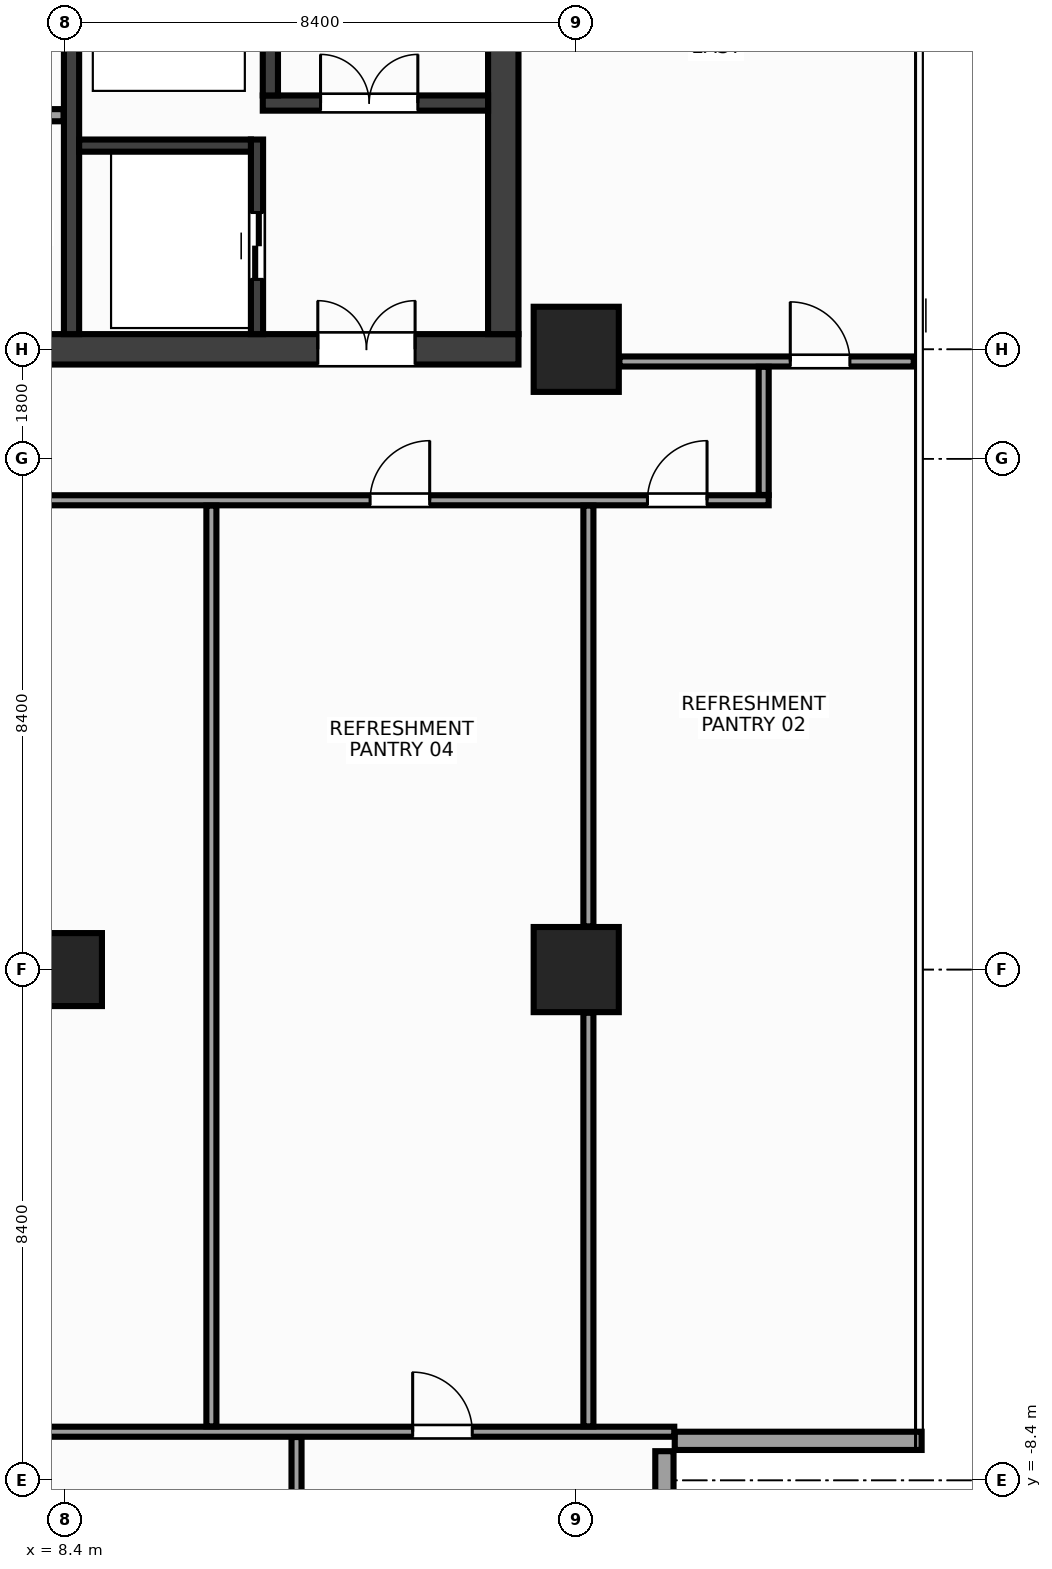
"""IFC4 building model, lengths in metres.
Left out: names, types, materials, properties, quantities, classifications, styles, units other than length and angle.
Written with IfcOpenShell. Run it as: python <this file> out.ifc"""

import sys

from ifc_helpers import new_model, si_unit, direction, frame, frame_2d, origin, origin_2d, place, context, subcontext, project, spatial, rectangle, extrude, source, transform, mapped, element, fill, save


model = new_model("IFC4")
c1 = context("Model", 3, precision=1e-05, world=origin(), true_north=direction((0.0, 1.0)))
c2 = subcontext(c1, "Body", "Model", "MODEL_VIEW")
j1 = project(units=[si_unit("LENGTHUNIT", "METRE"), si_unit("PLANEANGLEUNIT", "RADIAN")], contexts=[c1])
p1 = place(None, origin())
s1 = spatial("IfcSite", under=j1, at=p1, CompositionType="ELEMENT")
p2 = place(p1, origin())
s2 = spatial("IfcBuilding", under=s1, at=p2, CompositionType="ELEMENT")
p3 = place(p2, frame((0.0, 0.0, 261.2)))
s3 = spatial("IfcBuildingStorey", under=s2, at=p3, CompositionType="ELEMENT", Elevation=261.2)
m1 = source(origin(), c2, "Body", "SweptSolid", [
    extrude(rectangle(XDim=31.7, YDim=0.5, at=frame_2d((15.85, 0.0))), origin(), (0.0, 0.0, 1.0), 3.6),
])
p4 = place(p3, frame((-15.85, 10.2, 0.0), z_axis=(0.0, 0.0, 1.0), x_axis=(1.0, 0.0, 0.0)))
e1 = element("IfcWall", 1, at=p4, inside=s3, PredefinedType="SHEAR", context=c2, shape_type="MappedRepresentation", body=[
    mapped(m1, transform((0.0, 0.0, 0.0), x_axis=(1.0, 0.0, 0.0), y_axis=(0.0, 1.0, 0.0), z_axis=(0.0, 0.0, 1.0), scale=1.0)),
])
p5 = place(p4, frame((1.7, 0.0, 0.0)))
e2 = element("IfcOpeningElement", 2, at=p5, cuts=e1, PredefinedType="OPENING", context=c2, shape_type="SweptSolid", body=[
    extrude(rectangle(XDim=1.6, YDim=2.15, at=frame_2d((0.8, 1.075))), frame((0.0, 0.262, 0.0), z_axis=(0.0, -1.0, 0.0), x_axis=(1.0, 0.0, 0.0)), (0.0, 0.0, 1.0), 0.524),
])
p6 = place(p4, frame((28.4, 0.0, 0.0)))
e3 = element("IfcOpeningElement", 3, at=p6, cuts=e1, PredefinedType="OPENING", context=c2, shape_type="SweptSolid", body=[
    extrude(rectangle(XDim=1.6, YDim=2.15, at=frame_2d((0.8, 1.075))), frame((0.0, 0.262, 0.0), z_axis=(0.0, -1.0, 0.0), x_axis=(1.0, 0.0, 0.0)), (0.0, 0.0, 1.0), 0.524),
])
p7 = place(p4, frame((15.1, 0.0, 0.0)))
e4 = element("IfcOpeningElement", 4, at=p7, cuts=e1, PredefinedType="OPENING", context=c2, shape_type="SweptSolid", body=[
    extrude(rectangle(XDim=1.5, YDim=2.2, at=frame_2d((0.75, 1.1))), frame((0.0, 0.262, 0.0), z_axis=(0.0, -1.0, 0.0), x_axis=(1.0, 0.0, 0.0)), (0.0, 0.0, 1.0), 0.524),
])
m2 = source(origin(), c2, "Body", "SweptSolid", [
    extrude(rectangle(XDim=13.1, YDim=0.5, at=frame_2d((6.55, 0.0))), origin(), (0.0, 0.0, 1.0), 3.6),
])
p8 = place(p3, frame((15.6, 10.45, 0.0), z_axis=(0.0, 0.0, 1.0), x_axis=(0.0, 1.0, 0.0)))
e5 = element("IfcWall", 5, at=p8, inside=s3, PredefinedType="SHEAR", context=c2, shape_type="MappedRepresentation", body=[
    mapped(m2, transform((0.0, 0.0, 0.0), x_axis=(1.0, 0.0, 0.0), y_axis=(0.0, 1.0, 0.0), z_axis=(0.0, 0.0, 1.0), scale=1.0)),
])
m3 = source(origin(), c2, "Body", "SweptSolid", [
    extrude(rectangle(XDim=13.1, YDim=0.25, at=frame_2d((6.55, 0.0))), origin(), (0.0, 0.0, 1.0), 3.6),
])
p9 = place(p3, frame((8.5, 10.45, 0.0), z_axis=(0.0, 0.0, 1.0), x_axis=(0.0, 1.0, 0.0)))
e6 = element("IfcWall", 6, at=p9, inside=s3, PredefinedType="SHEAR", context=c2, shape_type="MappedRepresentation", body=[
    mapped(m3, transform((0.0, 0.0, 0.0), x_axis=(1.0, 0.0, 0.0), y_axis=(0.0, 1.0, 0.0), z_axis=(0.0, 0.0, 1.0), scale=1.0)),
])
p10 = place(p9, frame((10.0, 0.0, 0.0)))
e7 = element("IfcOpeningElement", 7, at=p10, cuts=e6, PredefinedType="OPENING", context=c2, shape_type="SweptSolid", body=[
    extrude(rectangle(XDim=0.95, YDim=2.15, at=frame_2d((0.475, 1.075))), frame((0.0, 0.137, 0.0), z_axis=(0.0, -1.0, 0.0), x_axis=(1.0, 0.0, 0.0)), (0.0, 0.0, 1.0), 0.274),
])
m4 = source(origin(), c2, "Body", "SweptSolid", [
    extrude(rectangle(XDim=3.705, YDim=0.25, at=frame_2d((1.853, 0.0))), origin(), (0.0, 0.0, 1.0), 3.6),
])
p11 = place(p3, frame((11.645, 14.25, 0.0), z_axis=(0.0, 0.0, 1.0), x_axis=(1.0, 0.0, 0.0)))
e8 = element("IfcWall", 8, at=p11, inside=s3, PredefinedType="SHEAR", context=c2, shape_type="MappedRepresentation", body=[
    mapped(m4, transform((0.0, 0.0, 0.0), x_axis=(1.0, 0.0, 0.0), y_axis=(0.0, 1.0, 0.0), z_axis=(0.0, 0.0, 1.0), scale=1.0)),
])
p12 = place(p11, frame((0.95, 0.0, 0.0)))
e9 = element("IfcOpeningElement", 9, at=p12, cuts=e8, PredefinedType="OPENING", context=c2, shape_type="SweptSolid", body=[
    extrude(rectangle(XDim=1.6, YDim=2.15, at=frame_2d((0.8, 1.075))), frame((0.0, 0.137, 0.0), z_axis=(0.0, -1.0, 0.0), x_axis=(1.0, 0.0, 0.0)), (0.0, 0.0, 1.0), 0.274),
])
m5 = source(origin(), c2, "Body", "SweptSolid", [
    extrude(rectangle(XDim=9.175, YDim=0.25, at=frame_2d((4.587, 0.0))), origin(), (0.0, 0.0, 1.0), 3.6),
])
p13 = place(p3, frame((11.77, 14.375, 0.0), z_axis=(0.0, 0.0, 1.0), x_axis=(0.0, 1.0, 0.0)))
e10 = element("IfcWall", 10, at=p13, inside=s3, PredefinedType="SHEAR", context=c2, shape_type="MappedRepresentation", body=[
    mapped(m5, transform((0.0, 0.0, 0.0), x_axis=(1.0, 0.0, 0.0), y_axis=(0.0, 1.0, 0.0), z_axis=(0.0, 0.0, 1.0), scale=1.0)),
])
m6 = source(origin(), c2, "Body", "SweptSolid", [
    extrude(rectangle(XDim=3.2, YDim=0.2, at=frame_2d((1.6, 0.0))), origin(), (0.0, 0.0, 1.0), 3.6),
])
p14 = place(p3, frame((11.55, 10.45, 0.0), z_axis=(0.0, 0.0, 1.0), x_axis=(0.0, 1.0, 0.0)))
e11 = element("IfcWall", 11, at=p14, inside=s3, PredefinedType="SHEAR", context=c2, shape_type="MappedRepresentation", body=[
    mapped(m6, transform((0.0, 0.0, 0.0), x_axis=(1.0, 0.0, 0.0), y_axis=(0.0, 1.0, 0.0), z_axis=(0.0, 0.0, 1.0), scale=1.0)),
])
p15 = place(p14, frame((0.9, 0.0, 0.0)))
e12 = element("IfcOpeningElement", 12, at=p15, cuts=e11, PredefinedType="OPENING", context=c2, shape_type="SweptSolid", body=[
    extrude(rectangle(XDim=1.1, YDim=2.15, at=frame_2d((0.55, 1.075))), frame((0.0, 0.112, 0.0), z_axis=(0.0, -1.0, 0.0), x_axis=(1.0, 0.0, 0.0)), (0.0, 0.0, 1.0), 0.224),
])
m7 = source(origin(), c2, "Body", "SweptSolid", [
    extrude(rectangle(XDim=2.825, YDim=0.2, at=frame_2d((1.413, 0.0))), origin(), (0.0, 0.0, 1.0), 3.6),
])
p16 = place(p3, frame((8.625, 13.55, 0.0), z_axis=(0.0, 0.0, 1.0), x_axis=(1.0, 0.0, 0.0)))
e13 = element("IfcWall", 13, at=p16, inside=s3, PredefinedType="SHEAR", context=c2, shape_type="MappedRepresentation", body=[
    mapped(m7, transform((0.0, 0.0, 0.0), x_axis=(1.0, 0.0, 0.0), y_axis=(0.0, 1.0, 0.0), z_axis=(0.0, 0.0, 1.0), scale=1.0)),
])
m8 = source(origin(), c2, "Body", "SweptSolid", [
    extrude(rectangle(XDim=1.4, YDim=1.4, at=origin_2d()), origin(), (0.0, 0.0, 1.0), 3.6),
])
for number, where, z_axis, x_axis in (
    (14, (16.8, 0.0, 0.0), (0.0, 0.0, 1.0), (1.0, 0.0, 0.0)),
    (15, (16.8, 10.2, 0.0), (0.0, 0.0, 1.0), (1.0, 0.0, 0.0)),
):
    element("IfcColumn", number, at=place(p3, frame(where, z_axis=z_axis, x_axis=x_axis)), inside=s3, PredefinedType="COLUMN", context=c2, shape_type="MappedRepresentation", body=[
        mapped(m8, transform((0.0, 0.0, 0.0), x_axis=(1.0, 0.0, 0.0), y_axis=(0.0, 1.0, 0.0), z_axis=(0.0, 0.0, 1.0), scale=1.0)),
    ])
m9 = source(origin(), c2, "Body", "SweptSolid", [
    extrude(rectangle(XDim=1.2, YDim=1.2, at=origin_2d()), origin(), (0.0, 0.0, 1.0), 3.6),
])
p17 = place(p3, frame((8.4, 0.0, 0.0), z_axis=(0.0, 0.0, 1.0), x_axis=(1.0, 0.0, 0.0)))
e16 = element("IfcColumn", 16, at=p17, inside=s3, PredefinedType="COLUMN", context=c2, shape_type="MappedRepresentation", body=[
    mapped(m9, transform((0.0, 0.0, 0.0), x_axis=(1.0, 0.0, 0.0), y_axis=(0.0, 1.0, 0.0), z_axis=(0.0, 0.0, 1.0), scale=1.0)),
])
m10 = source(origin(), c2, "Body", "SweptSolid", [
    extrude(rectangle(XDim=4.06, YDim=0.3, at=frame_2d((2.03, 0.0))), origin(), (0.0, 0.0, 1.0), 2.75),
])
for number, where, z_axis, x_axis in (
    (17, (18.25, -11.98, 0.0), (0.0, 0.0, 1.0), (0.0, 1.0, 0.0)),
    (18, (18.42, -7.75, 0.0), (0.0, 0.0, 1.0), (1.0, 0.0, 0.0)),
):
    element("IfcWall", number, at=place(p3, frame(where, z_axis=z_axis, x_axis=x_axis)), inside=s3, PredefinedType="STANDARD", context=c2, shape_type="MappedRepresentation", body=[
        mapped(m10, transform((0.0, 0.0, 0.0), x_axis=(1.0, 0.0, 0.0), y_axis=(0.0, 1.0, 0.0), z_axis=(0.0, 0.0, 1.0), scale=1.0)),
    ])
m11 = source(origin(), c2, "Body", "SweptSolid", [
    extrude(rectangle(XDim=7.07, YDim=0.2, at=frame_2d((3.535, 0.0))), origin(), (0.0, 0.0, 1.0), 3.37),
])
p18 = place(p3, frame((1.3, 14.05, 0.0), z_axis=(0.0, 0.0, 1.0), x_axis=(1.0, 0.0, 0.0)))
e19 = element("IfcWall", 19, at=p18, inside=s3, PredefinedType="PARTITIONING", context=c2, shape_type="MappedRepresentation", body=[
    mapped(m11, transform((0.0, 0.0, 0.0), x_axis=(1.0, 0.0, 0.0), y_axis=(0.0, 1.0, 0.0), z_axis=(0.0, 0.0, 1.0), scale=1.0)),
])
p19 = place(p18, frame((1.71, 0.0, 0.0)))
e20 = element("IfcOpeningElement", 20, at=p19, cuts=e19, PredefinedType="OPENING", context=c2, shape_type="SweptSolid", body=[
    extrude(rectangle(XDim=0.9, YDim=2.15, at=frame_2d((0.45, 1.075))), frame((0.0, 0.112, 0.0), z_axis=(0.0, -1.0, 0.0), x_axis=(1.0, 0.0, 0.0)), (0.0, 0.0, 1.0), 0.224),
])
p20 = place(p18, frame((5.16, 0.0, 0.0)))
e21 = element("IfcOpeningElement", 21, at=p20, cuts=e19, PredefinedType="OPENING", context=c2, shape_type="SweptSolid", body=[
    extrude(rectangle(XDim=0.9, YDim=2.15, at=frame_2d((0.45, 1.075))), frame((0.0, 0.112, 0.0), z_axis=(0.0, -1.0, 0.0), x_axis=(1.0, 0.0, 0.0)), (0.0, 0.0, 1.0), 0.224),
])
m12 = source(origin(), c2, "Body", "SweptSolid", [
    extrude(rectangle(XDim=4.84, YDim=0.165, at=frame_2d((2.42, 0.0))), origin(), (0.0, 0.0, 1.0), 3.37),
])
p21 = place(p3, frame((17.51, 10.0, 0.0), z_axis=(0.0, 0.0, 1.0), x_axis=(1.0, 0.0, 0.0)))
e22 = element("IfcWall", 22, at=p21, inside=s3, PredefinedType="PARTITIONING", context=c2, shape_type="MappedRepresentation", body=[
    mapped(m12, transform((0.0, 0.0, 0.0), x_axis=(1.0, 0.0, 0.0), y_axis=(0.0, 1.0, 0.0), z_axis=(0.0, 0.0, 1.0), scale=1.0)),
])
p22 = place(p21, frame((2.81, 0.0, 0.0)))
e23 = element("IfcOpeningElement", 23, at=p22, cuts=e22, PredefinedType="OPENING", context=c2, shape_type="SweptSolid", body=[
    extrude(rectangle(XDim=0.98, YDim=2.15, at=frame_2d((0.49, 1.075))), frame((0.0, 0.094, 0.0), z_axis=(0.0, -1.0, 0.0), x_axis=(1.0, 0.0, 0.0)), (0.0, 0.0, 1.0), 0.189),
])
m13 = source(origin(), c2, "Body", "SweptSolid", [
    extrude(rectangle(XDim=21.9, YDim=0.165, at=frame_2d((10.95, 0.0))), origin(), (0.0, 0.0, 1.0), 2.755),
])
p23 = place(p3, frame((-1.935, 7.718, 0.0), z_axis=(0.0, 0.0, 1.0), x_axis=(1.0, 0.0, 0.0)))
e24 = element("IfcWall", 24, at=p23, inside=s3, PredefinedType="PARTITIONING", context=c2, shape_type="MappedRepresentation", body=[
    mapped(m13, transform((0.0, 0.0, 0.0), x_axis=(1.0, 0.0, 0.0), y_axis=(0.0, 1.0, 0.0), z_axis=(0.0, 0.0, 1.0), scale=1.0)),
])
p24 = place(p23, frame((19.906, 0.0, 0.0)))
e25 = element("IfcOpeningElement", 25, at=p24, cuts=e24, PredefinedType="OPENING", context=c2, shape_type="SweptSolid", body=[
    extrude(rectangle(XDim=0.98, YDim=2.15, at=frame_2d((0.49, 1.075))), frame((0.0, 0.094, 0.0), z_axis=(0.0, -1.0, 0.0), x_axis=(1.0, 0.0, 0.0)), (0.0, 0.0, 1.0), 0.189),
])
p25 = place(p23, frame((15.345, 0.0, 0.0)))
e26 = element("IfcOpeningElement", 26, at=p25, cuts=e24, PredefinedType="OPENING", context=c2, shape_type="SweptSolid", body=[
    extrude(rectangle(XDim=0.98, YDim=2.15, at=frame_2d((0.49, 1.075))), frame((0.0, 0.094, 0.0), z_axis=(0.0, -1.0, 0.0), x_axis=(1.0, 0.0, 0.0)), (0.0, 0.0, 1.0), 0.189),
])
m14 = source(origin(), c2, "Body", "SweptSolid", [
    extrude(rectangle(XDim=2.108, YDim=0.165, at=frame_2d((1.054, 0.0))), origin(), (0.0, 0.0, 1.0), 3.37),
])
p26 = place(p3, frame((19.883, 7.805, 0.0), z_axis=(0.0, 0.0, 1.0), x_axis=(0.0, 1.0, 0.0)))
e27 = element("IfcWall", 27, at=p26, inside=s3, PredefinedType="PARTITIONING", context=c2, shape_type="MappedRepresentation", body=[
    mapped(m14, transform((0.0, 0.0, 0.0), x_axis=(1.0, 0.0, 0.0), y_axis=(0.0, 1.0, 0.0), z_axis=(0.0, 0.0, 1.0), scale=1.0)),
])
m15 = source(origin(), c2, "Body", "SweptSolid", [
    extrude(rectangle(XDim=36.824, YDim=0.165, at=frame_2d((18.412, 0.0))), origin(), (0.0, 0.0, 1.0), 2.755),
])
p27 = place(p3, frame((-18.412, -7.6, 0.0), z_axis=(0.0, 0.0, 1.0), x_axis=(1.0, 0.0, 0.0)))
e28 = element("IfcWall", 28, at=p27, inside=s3, PredefinedType="PARTITIONING", context=c2, shape_type="MappedRepresentation", body=[
    mapped(m15, transform((0.0, 0.0, 0.0), x_axis=(1.0, 0.0, 0.0), y_axis=(0.0, 1.0, 0.0), z_axis=(0.0, 0.0, 1.0), scale=1.0)),
])
p28 = place(p27, frame((3.222, 0.0, 0.0)))
e29 = element("IfcOpeningElement", 29, at=p28, cuts=e28, PredefinedType="OPENING", context=c2, shape_type="SweptSolid", body=[
    extrude(rectangle(XDim=0.98, YDim=2.15, at=frame_2d((0.49, 1.075))), frame((0.0, 0.094, 0.0), z_axis=(0.0, -1.0, 0.0), x_axis=(1.0, 0.0, 0.0)), (0.0, 0.0, 1.0), 0.189),
])
p29 = place(p27, frame((32.522, 0.0, 0.0)))
e30 = element("IfcOpeningElement", 30, at=p29, cuts=e28, PredefinedType="OPENING", context=c2, shape_type="SweptSolid", body=[
    extrude(rectangle(XDim=0.98, YDim=2.15, at=frame_2d((0.49, 1.075))), frame((0.0, 0.094, 0.0), z_axis=(0.0, -1.0, 0.0), x_axis=(1.0, 0.0, 0.0)), (0.0, 0.0, 1.0), 0.189),
])
p30 = place(p27, frame((9.922, 0.0, 0.0)))
e31 = element("IfcOpeningElement", 31, at=p30, cuts=e28, PredefinedType="OPENING", context=c2, shape_type="SweptSolid", body=[
    extrude(rectangle(XDim=0.98, YDim=2.15, at=frame_2d((0.49, 1.075))), frame((0.0, 0.094, 0.0), z_axis=(0.0, -1.0, 0.0), x_axis=(1.0, 0.0, 0.0)), (0.0, 0.0, 1.0), 0.189),
])
p31 = place(p27, frame((17.122, 0.0, 0.0)))
e32 = element("IfcOpeningElement", 32, at=p31, cuts=e28, PredefinedType="OPENING", context=c2, shape_type="SweptSolid", body=[
    extrude(rectangle(XDim=0.98, YDim=2.15, at=frame_2d((0.49, 1.075))), frame((0.0, 0.094, 0.0), z_axis=(0.0, -1.0, 0.0), x_axis=(1.0, 0.0, 0.0)), (0.0, 0.0, 1.0), 0.189),
])
p32 = place(p27, frame((25.122, 0.0, 0.0)))
e33 = element("IfcOpeningElement", 33, at=p32, cuts=e28, PredefinedType="OPENING", context=c2, shape_type="SweptSolid", body=[
    extrude(rectangle(XDim=0.98, YDim=2.15, at=frame_2d((0.49, 1.075))), frame((0.0, 0.094, 0.0), z_axis=(0.0, -1.0, 0.0), x_axis=(1.0, 0.0, 0.0)), (0.0, 0.0, 1.0), 0.189),
])
m16 = source(origin(), c2, "Body", "SweptSolid", [
    extrude(rectangle(XDim=15.142, YDim=0.165, at=frame_2d((7.571, 0.0))), origin(), (0.0, 0.0, 1.0), 2.655),
])
p33 = place(p3, frame((10.8, -7.512, 0.0), z_axis=(0.0, 0.0, 1.0), x_axis=(0.0, 1.0, 0.0)))
e34 = element("IfcWall", 34, at=p33, inside=s3, PredefinedType="PARTITIONING", context=c2, shape_type="MappedRepresentation", body=[
    mapped(m16, transform((0.0, 0.0, 0.0), x_axis=(1.0, 0.0, 0.0), y_axis=(0.0, 1.0, 0.0), z_axis=(0.0, 0.0, 1.0), scale=1.0)),
])
m17 = source(origin(), c2, "Body", "SweptSolid", [
    extrude(rectangle(XDim=6.802, YDim=0.165, at=frame_2d((3.401, 0.0))), origin(), (0.0, 0.0, 1.0), 2.755),
])
p34 = place(p3, frame((17.0, -7.512, 0.0), z_axis=(0.0, 0.0, 1.0), x_axis=(0.0, 1.0, 0.0)))
e35 = element("IfcWall", 35, at=p34, inside=s3, PredefinedType="PARTITIONING", context=c2, shape_type="MappedRepresentation", body=[
    mapped(m17, transform((0.0, 0.0, 0.0), x_axis=(1.0, 0.0, 0.0), y_axis=(0.0, 1.0, 0.0), z_axis=(0.0, 0.0, 1.0), scale=1.0)),
])
m18 = source(origin(), c2, "Body", "SweptSolid", [
    extrude(rectangle(XDim=6.92, YDim=0.165, at=frame_2d((3.46, 0.0))), origin(), (0.0, 0.0, 1.0), 2.755),
])
p35 = place(p3, frame((17.0, 0.71, 0.0), z_axis=(0.0, 0.0, 1.0), x_axis=(0.0, 1.0, 0.0)))
e36 = element("IfcWall", 36, at=p35, inside=s3, PredefinedType="PARTITIONING", context=c2, shape_type="MappedRepresentation", body=[
    mapped(m18, transform((0.0, 0.0, 0.0), x_axis=(1.0, 0.0, 0.0), y_axis=(0.0, 1.0, 0.0), z_axis=(0.0, 0.0, 1.0), scale=1.0)),
])
m19 = source(origin(), c2, "Body", "SweptSolid", [
    extrude(rectangle(XDim=4.163, YDim=0.165, at=frame_2d((2.081, 0.0))), origin(), (0.0, 0.0, 1.0), 2.905),
])
p36 = place(p3, frame((12.2, -11.85, 0.0), z_axis=(0.0, 0.0, 1.0), x_axis=(0.0, 1.0, 0.0)))
e37 = element("IfcWall", 37, at=p36, inside=s3, PredefinedType="PARTITIONING", context=c2, shape_type="MappedRepresentation", body=[
    mapped(m19, transform((0.0, 0.0, 0.0), x_axis=(1.0, 0.0, 0.0), y_axis=(0.0, 1.0, 0.0), z_axis=(0.0, 0.0, 1.0), scale=1.0)),
])
m20 = source(origin(), c2, "Body", "SweptSolid", [
    extrude(rectangle(XDim=1.6, YDim=2.15, at=frame_2d((0.8, 1.075))), frame((0.0, 0.025, 0.0), z_axis=(0.0, -1.0, 0.0), x_axis=(1.0, 0.0, 0.0)), (0.0, 0.0, 1.0), 0.05),
])
p37 = place(p12, origin())
e38 = element("IfcDoor", 38, at=p37, inside=s3, OperationType="DOUBLE_DOOR_SINGLE_SWING", PredefinedType="DOOR", context=c2, shape_type="MappedRepresentation", body=[
    mapped(m20, transform((0.0, 0.0, 0.0), x_axis=(1.0, 0.0, 0.0), y_axis=(0.0, 1.0, 0.0), z_axis=(0.0, 0.0, 1.0), scale=1.0)),
])
fill(e9, e38)
p38 = place(p6, origin())
e39 = element("IfcDoor", 39, at=p38, inside=s3, OperationType="DOUBLE_DOOR_SINGLE_SWING", PredefinedType="DOOR", context=c2, shape_type="MappedRepresentation", body=[
    mapped(m20, transform((0.0, 0.0, 0.0), x_axis=(1.0, 0.0, 0.0), y_axis=(0.0, 1.0, 0.0), z_axis=(0.0, 0.0, 1.0), scale=1.0)),
])
fill(e3, e39)
m21 = source(origin(), c2, "Body", "SweptSolid", [
    extrude(rectangle(XDim=1.1, YDim=2.15, at=frame_2d((0.55, 1.075))), frame((0.0, 0.025, 0.0), z_axis=(0.0, -1.0, 0.0), x_axis=(1.0, 0.0, 0.0)), (0.0, 0.0, 1.0), 0.05),
])
p39 = place(p15, origin())
e40 = element("IfcDoor", 40, at=p39, inside=s3, OperationType="DOUBLE_DOOR_SLIDING", PredefinedType="DOOR", context=c2, shape_type="MappedRepresentation", body=[
    mapped(m21, transform((0.0, 0.0, 0.0), x_axis=(1.0, 0.0, 0.0), y_axis=(0.0, 1.0, 0.0), z_axis=(0.0, 0.0, 1.0), scale=1.0)),
])
fill(e12, e40)
m22 = source(origin(), c2, "Body", "SweptSolid", [
    extrude(rectangle(XDim=0.98, YDim=2.15, at=frame_2d((0.49, 1.075))), frame((0.0, 0.025, 0.0), z_axis=(0.0, -1.0, 0.0), x_axis=(1.0, 0.0, 0.0)), (0.0, 0.0, 1.0), 0.05),
])
p40 = place(p24, origin())
e41 = element("IfcDoor", 41, at=p40, inside=s3, OperationType="SINGLE_SWING_RIGHT", PredefinedType="DOOR", context=c2, shape_type="MappedRepresentation", body=[
    mapped(m22, transform((0.0, 0.0, 0.0), x_axis=(1.0, 0.0, 0.0), y_axis=(0.0, 1.0, 0.0), z_axis=(0.0, 0.0, 1.0), scale=1.0)),
])
fill(e25, e41)
p41 = place(p25, origin())
e42 = element("IfcDoor", 42, at=p41, inside=s3, OperationType="SINGLE_SWING_RIGHT", PredefinedType="DOOR", context=c2, shape_type="MappedRepresentation", body=[
    mapped(m22, transform((0.0, 0.0, 0.0), x_axis=(1.0, 0.0, 0.0), y_axis=(0.0, 1.0, 0.0), z_axis=(0.0, 0.0, 1.0), scale=1.0)),
])
fill(e26, e42)
p42 = place(p22, origin())
e43 = element("IfcDoor", 43, at=p42, inside=s3, OperationType="SINGLE_SWING_LEFT", PredefinedType="DOOR", context=c2, shape_type="MappedRepresentation", body=[
    mapped(m22, transform((0.0, 0.0, 0.0), x_axis=(1.0, 0.0, 0.0), y_axis=(0.0, 1.0, 0.0), z_axis=(0.0, 0.0, 1.0), scale=1.0)),
])
fill(e23, e43)
p43 = place(p29, origin())
e44 = element("IfcDoor", 44, at=p43, inside=s3, OperationType="SINGLE_SWING_LEFT", PredefinedType="DOOR", context=c2, shape_type="MappedRepresentation", body=[
    mapped(m22, transform((0.0, 0.0, 0.0), x_axis=(1.0, 0.0, 0.0), y_axis=(0.0, 1.0, 0.0), z_axis=(0.0, 0.0, 1.0), scale=1.0)),
])
fill(e30, e44)
save(model, sys.argv[1])
